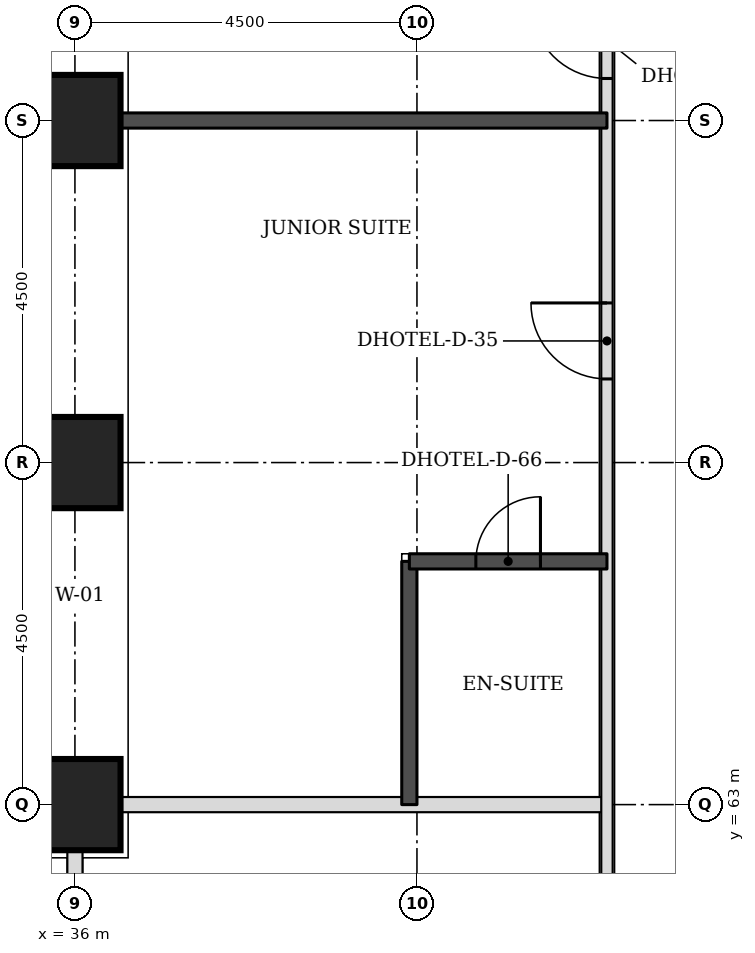
"""IFC4 building model, lengths in metres.
Left out: names, types, materials, properties, quantities, classifications, styles, units other than length and angle.
Written with IfcOpenShell. Run it as: python <this file> out.ifc"""

import sys

from ifc_helpers import new_model, si_unit, direction, frame, frame_2d, origin, origin_2d, place, context, subcontext, project, spatial, rectangle, extrude, element, fill, save


model = new_model("IFC4")
c1 = context("Model", 3, precision=1e-05, world=origin(), true_north=direction((0.0, 1.0)))
c2 = subcontext(c1, "Body", "Model", "MODEL_VIEW")
j1 = project(units=[si_unit("LENGTHUNIT", "METRE"), si_unit("PLANEANGLEUNIT", "RADIAN")], contexts=[c1])
p1 = place(None, origin())
s1 = spatial("IfcSite", under=j1, at=p1, CompositionType="ELEMENT")
p2 = place(p1, origin())
s2 = spatial("IfcBuilding", under=s1, at=p2, CompositionType="ELEMENT")
p3 = place(p2, frame((0.0, 0.0, 59.4)))
s3 = spatial("IfcBuildingStorey", under=s2, at=p3, CompositionType="ELEMENT", Elevation=59.4)
for number, where, z_axis, x_axis in (
    (1, (36.0, 63.0, 0.0), (0.0, 0.0, 1.0), (1.0, 0.0, 0.0)),
    (2, (36.0, 67.5, 0.0), (0.0, 0.0, 1.0), (1.0, 0.0, 0.0)),
    (3, (36.0, 72.0, 0.0), (0.0, 0.0, 1.0), (1.0, 0.0, 0.0)),
):
    element("IfcColumn", number, at=place(p3, frame(where, z_axis=z_axis, x_axis=x_axis)), inside=s3, PredefinedType="COLUMN", context=c2, shape_type="SweptSolid", body=[
        extrude(rectangle(XDim=1.2, YDim=1.2, at=origin_2d()), origin(), (0.0, 0.0, 1.0), 3.3),
    ])
p4 = place(p3, frame((36.0, 57.35, 0.0), z_axis=(0.0, 0.0, 1.0), x_axis=(0.0, 1.0, 0.0)))
e4 = element("IfcWall", 4, at=p4, inside=s3, PredefinedType="PARTITIONING", context=c2, shape_type="SweptSolid", body=[
    extrude(rectangle(XDim=5.05, YDim=0.2, at=frame_2d((2.525, 0.0))), origin(), (0.0, 0.0, 1.0), 2.33),
])
p5 = place(p3, frame((36.6, 63.0, 0.0), z_axis=(0.0, 0.0, 1.0), x_axis=(1.0, 0.0, 0.0)))
e5 = element("IfcWall", 5, at=p5, inside=s3, PredefinedType="PARTITIONING", context=c2, shape_type="SweptSolid", body=[
    extrude(rectangle(XDim=6.4, YDim=0.2, at=frame_2d((3.2, 0.0))), origin(), (0.0, 0.0, 1.0), 3.08),
])
p6 = place(p3, frame((43.0, 57.35, 0.0), z_axis=(0.0, 0.0, 1.0), x_axis=(0.0, 1.0, 0.0)))
e6 = element("IfcWall", 6, at=p6, inside=s3, PredefinedType="PARTITIONING", context=c2, shape_type="SweptSolid", body=[
    extrude(rectangle(XDim=16.65, YDim=0.15, at=frame_2d((8.325, 0.0))), origin(), (0.0, 0.0, 1.0), 3.08),
])
p7 = place(p6, frame((11.25, 0.0, 0.0)))
e7 = element("IfcOpeningElement", 7, at=p7, cuts=e6, PredefinedType="OPENING", context=c2, shape_type="SweptSolid", body=[
    extrude(rectangle(XDim=1.0, YDim=2.1, at=frame_2d((0.5, 1.05))), frame((0.0, 0.085, 0.0), z_axis=(0.0, -1.0, 0.0), x_axis=(1.0, 0.0, 0.0)), (0.0, 0.0, 1.0), 0.17),
])
p8 = place(p6, frame((15.203, 0.0, 0.0)))
e8 = element("IfcOpeningElement", 8, at=p8, cuts=e6, PredefinedType="OPENING", context=c2, shape_type="SweptSolid", body=[
    extrude(rectangle(XDim=1.0, YDim=2.1, at=frame_2d((0.5, 1.05))), frame((0.0, 0.085, 0.0), z_axis=(0.0, -1.0, 0.0), x_axis=(1.0, 0.0, 0.0)), (0.0, 0.0, 1.0), 0.17),
])
p9 = place(p3, frame((40.4, 63.0, 0.0), z_axis=(0.0, 0.0, 1.0), x_axis=(0.0, 1.0, 0.0)))
e9 = element("IfcWall", 9, at=p9, inside=s3, PredefinedType="SOLIDWALL", context=c2, shape_type="SweptSolid", body=[
    extrude(rectangle(XDim=3.2, YDim=0.2, at=frame_2d((1.6, 0.0))), origin(), (0.0, 0.0, 1.0), 3.08),
])
p10 = place(p3, frame((40.4, 66.2, 0.0), z_axis=(0.0, 0.0, 1.0), x_axis=(1.0, 0.0, 0.0)))
e10 = element("IfcWall", 10, at=p10, inside=s3, PredefinedType="SOLIDWALL", context=c2, shape_type="SweptSolid", body=[
    extrude(rectangle(XDim=2.6, YDim=0.2, at=frame_2d((1.3, 0.0))), origin(), (0.0, 0.0, 1.0), 3.08),
])
p11 = place(p10, frame((0.875, 0.0, 0.0)))
e11 = element("IfcOpeningElement", 11, at=p11, cuts=e10, PredefinedType="OPENING", context=c2, shape_type="SweptSolid", body=[
    extrude(rectangle(XDim=0.85, YDim=2.1, at=frame_2d((0.425, 1.05))), frame((0.0, 0.11, 0.0), z_axis=(0.0, -1.0, 0.0), x_axis=(1.0, 0.0, 0.0)), (0.0, 0.0, 1.0), 0.22),
])
p12 = place(p3, frame((36.6, 72.0, 0.0), z_axis=(0.0, 0.0, 1.0), x_axis=(1.0, 0.0, 0.0)))
e12 = element("IfcWall", 12, at=p12, inside=s3, PredefinedType="SOLIDWALL", context=c2, shape_type="SweptSolid", body=[
    extrude(rectangle(XDim=6.4, YDim=0.2, at=frame_2d((3.2, 0.0))), origin(), (0.0, 0.0, 1.0), 3.08),
])
p13 = place(p7, origin())
e13 = element("IfcDoor", 13, at=p13, inside=s3, OperationType="SINGLE_SWING_RIGHT", PredefinedType="DOOR", context=c2, shape_type="SweptSolid", body=[
    extrude(rectangle(XDim=1.0, YDim=2.1, at=frame_2d((0.5, 1.05))), frame((0.0, 0.025, 0.0), z_axis=(0.0, -1.0, 0.0), x_axis=(1.0, 0.0, 0.0)), (0.0, 0.0, 1.0), 0.05),
])
fill(e7, e13)
p14 = place(p11, origin())
e14 = element("IfcDoor", 14, at=p14, inside=s3, OperationType="SINGLE_SWING_RIGHT", PredefinedType="DOOR", context=c2, shape_type="SweptSolid", body=[
    extrude(rectangle(XDim=0.85, YDim=2.1, at=frame_2d((0.425, 1.05))), frame((0.0, 0.025, 0.0), z_axis=(0.0, -1.0, 0.0), x_axis=(1.0, 0.0, 0.0)), (0.0, 0.0, 1.0), 0.05),
])
fill(e11, e14)
p15 = place(p8, origin())
e15 = element("IfcDoor", 15, at=p15, inside=s3, OperationType="SINGLE_SWING_RIGHT", PredefinedType="DOOR", context=c2, shape_type="SweptSolid", body=[
    extrude(rectangle(XDim=1.0, YDim=2.1, at=frame_2d((0.5, 1.05))), frame((0.0, 0.025, 0.0), z_axis=(0.0, -1.0, 0.0), x_axis=(1.0, 0.0, 0.0)), (0.0, 0.0, 1.0), 0.05),
])
fill(e8, e15)
save(model, sys.argv[1])
